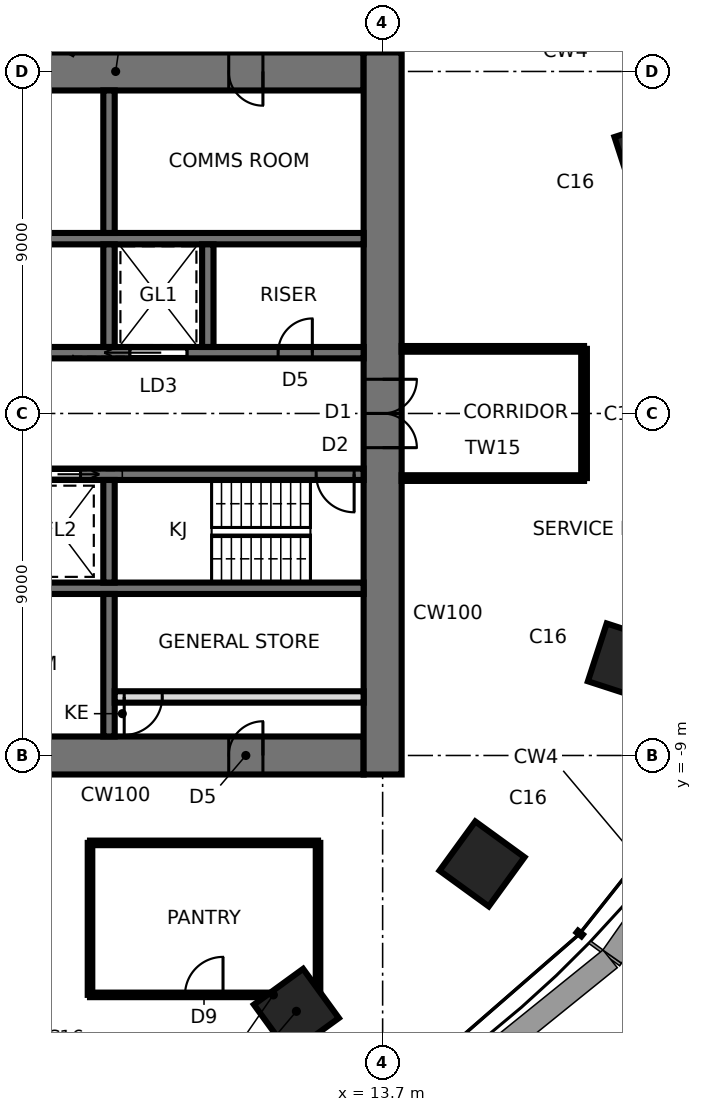
"""IFC4 building model, lengths in metres.
Left out: names, types, materials, properties, quantities, classifications, styles, units other than length and angle.
Written with IfcOpenShell. Run it as: python <this file> out.ifc"""

import sys

from ifc_helpers import new_model, si_unit, direction, frame, frame_2d, origin, origin_2d, place, context, subcontext, project, spatial, rectangle, extrude, element, fill, save


model = new_model("IFC4")
c1 = context("Model", 3, precision=1e-05, world=origin(), true_north=direction((0.0, 1.0)))
c2 = subcontext(c1, "Body", "Model", "MODEL_VIEW")
j1 = project(units=[si_unit("LENGTHUNIT", "METRE"), si_unit("PLANEANGLEUNIT", "RADIAN")], contexts=[c1])
p1 = place(None, origin())
s1 = spatial("IfcSite", under=j1, at=p1, CompositionType="ELEMENT")
p2 = place(p1, origin())
s2 = spatial("IfcBuilding", under=s1, at=p2, CompositionType="ELEMENT")
p3 = place(p2, frame((0.0, 0.0, 135.3)))
s3 = spatial("IfcBuildingStorey", under=s2, at=p3, CompositionType="ELEMENT", Elevation=135.3)
for number, where, z_axis, x_axis in (
    (1, (20.808, 6.761, 0.0), (0.0, 0.0, 1.0), (0.951, 0.309, 0.0)),
    (2, (11.43, -15.733, 0.0), (0.0, 0.0, 1.0), (0.588, -0.809, 0.0)),
    (3, (16.315, -11.854, 0.0), (0.0, 0.0, 1.0), (0.809, -0.588, 0.0)),
    (4, (20.109, -6.534, 0.0), (0.0, 0.0, 1.0), (0.951, -0.309, 0.0)),
):
    element("IfcColumn", number, at=place(p3, frame(where, z_axis=z_axis, x_axis=x_axis)), inside=s3, PredefinedType="COLUMN", context=c2, shape_type="SweptSolid", body=[
        extrude(rectangle(XDim=1.6, YDim=1.6, at=origin_2d()), origin(), (0.0, 0.0, 1.0), 3.9),
    ])
p4 = place(p3, frame((-13.2, -9.0, 0.0), z_axis=(0.0, 0.0, 1.0), x_axis=(1.0, 0.0, 0.0)))
e5 = element("IfcWall", 5, at=p4, inside=s3, PredefinedType="SHEAR", context=c2, shape_type="SweptSolid", body=[
    extrude(rectangle(XDim=26.4, YDim=1.0, at=frame_2d((13.2, 0.0))), origin(), (0.0, 0.0, 1.0), 3.9),
])
p5 = place(p4, frame((2.65, 0.0, 0.0)))
e6 = element("IfcOpeningElement", 6, at=p5, cuts=e5, PredefinedType="OPENING", context=c2, shape_type="SweptSolid", body=[
    extrude(rectangle(XDim=0.9, YDim=2.1, at=frame_2d((0.45, 1.05))), frame((0.0, 0.51, 0.0), z_axis=(0.0, -1.0, 0.0), x_axis=(1.0, 0.0, 0.0)), (0.0, 0.0, 1.0), 1.02),
])
p6 = place(p4, frame((9.5, 0.0, 0.0)))
e7 = element("IfcOpeningElement", 7, at=p6, cuts=e5, PredefinedType="OPENING", context=c2, shape_type="SweptSolid", body=[
    extrude(rectangle(XDim=0.9, YDim=2.1, at=frame_2d((0.45, 1.05))), frame((0.0, 0.51, 0.0), z_axis=(0.0, -1.0, 0.0), x_axis=(1.0, 0.0, 0.0)), (0.0, 0.0, 1.0), 1.02),
])
p7 = place(p4, frame((16.0, 0.0, 0.0)))
e8 = element("IfcOpeningElement", 8, at=p7, cuts=e5, PredefinedType="OPENING", context=c2, shape_type="SweptSolid", body=[
    extrude(rectangle(XDim=0.9, YDim=2.1, at=frame_2d((0.45, 1.05))), frame((0.0, 0.51, 0.0), z_axis=(0.0, -1.0, 0.0), x_axis=(1.0, 0.0, 0.0)), (0.0, 0.0, 1.0), 1.02),
])
p8 = place(p4, frame((22.85, 0.0, 0.0)))
e9 = element("IfcOpeningElement", 9, at=p8, cuts=e5, PredefinedType="OPENING", context=c2, shape_type="SweptSolid", body=[
    extrude(rectangle(XDim=0.9, YDim=2.1, at=frame_2d((0.45, 1.05))), frame((0.0, 0.51, 0.0), z_axis=(0.0, -1.0, 0.0), x_axis=(1.0, 0.0, 0.0)), (0.0, 0.0, 1.0), 1.02),
])
p9 = place(p3, frame((13.2, 9.0, 0.0), z_axis=(0.0, 0.0, 1.0), x_axis=(-1.0, 0.0, 0.0)))
e10 = element("IfcWall", 10, at=p9, inside=s3, PredefinedType="SHEAR", context=c2, shape_type="SweptSolid", body=[
    extrude(rectangle(XDim=26.4, YDim=1.0, at=frame_2d((13.2, 0.0))), origin(), (0.0, 0.0, 1.0), 3.9),
])
p10 = place(p9, frame((2.65, 0.0, 0.0)))
e11 = element("IfcOpeningElement", 11, at=p10, cuts=e10, PredefinedType="OPENING", context=c2, shape_type="SweptSolid", body=[
    extrude(rectangle(XDim=0.9, YDim=2.1, at=frame_2d((0.45, 1.05))), frame((0.0, 0.51, 0.0), z_axis=(0.0, -1.0, 0.0), x_axis=(1.0, 0.0, 0.0)), (0.0, 0.0, 1.0), 1.02),
])
p11 = place(p9, frame((9.5, 0.0, 0.0)))
e12 = element("IfcOpeningElement", 12, at=p11, cuts=e10, PredefinedType="OPENING", context=c2, shape_type="SweptSolid", body=[
    extrude(rectangle(XDim=0.9, YDim=2.1, at=frame_2d((0.45, 1.05))), frame((0.0, 0.51, 0.0), z_axis=(0.0, -1.0, 0.0), x_axis=(1.0, 0.0, 0.0)), (0.0, 0.0, 1.0), 1.02),
])
p12 = place(p9, frame((16.0, 0.0, 0.0)))
e13 = element("IfcOpeningElement", 13, at=p12, cuts=e10, PredefinedType="OPENING", context=c2, shape_type="SweptSolid", body=[
    extrude(rectangle(XDim=0.9, YDim=2.1, at=frame_2d((0.45, 1.05))), frame((0.0, 0.51, 0.0), z_axis=(0.0, -1.0, 0.0), x_axis=(1.0, 0.0, 0.0)), (0.0, 0.0, 1.0), 1.02),
])
p13 = place(p9, frame((21.25, 0.0, 0.0)))
e14 = element("IfcOpeningElement", 14, at=p13, cuts=e10, PredefinedType="OPENING", context=c2, shape_type="SweptSolid", body=[
    extrude(rectangle(XDim=0.9, YDim=2.1, at=frame_2d((0.45, 1.05))), frame((0.0, 0.51, 0.0), z_axis=(0.0, -1.0, 0.0), x_axis=(1.0, 0.0, 0.0)), (0.0, 0.0, 1.0), 1.02),
])
p14 = place(p9, frame((24.8, 0.0, 0.0)))
e15 = element("IfcOpeningElement", 15, at=p14, cuts=e10, PredefinedType="OPENING", context=c2, shape_type="SweptSolid", body=[
    extrude(rectangle(XDim=1.0, YDim=2.1, at=frame_2d((0.5, 1.05))), frame((0.0, 0.51, 0.0), z_axis=(0.0, -1.0, 0.0), x_axis=(1.0, 0.0, 0.0)), (0.0, 0.0, 1.0), 1.02),
])
p15 = place(p3, frame((13.7, -9.5, 0.0), z_axis=(0.0, 0.0, 1.0), x_axis=(0.0, 1.0, 0.0)))
e16 = element("IfcWall", 16, at=p15, inside=s3, PredefinedType="SHEAR", context=c2, shape_type="SweptSolid", body=[
    extrude(rectangle(XDim=19.0, YDim=1.0, at=frame_2d((9.5, 0.0))), origin(), (0.0, 0.0, 1.0), 3.9),
])
p16 = place(p15, frame((8.6, 0.0, 0.0)))
e17 = element("IfcOpeningElement", 17, at=p16, cuts=e16, PredefinedType="OPENING", context=c2, shape_type="SweptSolid", body=[
    extrude(rectangle(XDim=1.8, YDim=2.4, at=frame_2d((0.9, 1.2))), frame((0.0, 0.51, 0.0), z_axis=(0.0, -1.0, 0.0), x_axis=(1.0, 0.0, 0.0)), (0.0, 0.0, 1.0), 1.02),
])
p17 = place(p3, frame((-13.2, 1.6, 0.0), z_axis=(0.0, 0.0, 1.0), x_axis=(1.0, 0.0, 0.0)))
e18 = element("IfcWall", 18, at=p17, inside=s3, PredefinedType="SHEAR", context=c2, shape_type="SweptSolid", body=[
    extrude(rectangle(XDim=26.4, YDim=0.3, at=frame_2d((13.2, 0.0))), origin(), (0.0, 0.0, 1.0), 3.9),
])
p18 = place(p17, frame((0.25, 0.0, 0.0)))
e19 = element("IfcOpeningElement", 19, at=p18, cuts=e18, PredefinedType="OPENING", context=c2, shape_type="SweptSolid", body=[
    extrude(rectangle(XDim=1.0, YDim=2.1, at=frame_2d((0.5, 1.05))), frame((0.0, 0.16, 0.0), z_axis=(0.0, -1.0, 0.0), x_axis=(1.0, 0.0, 0.0)), (0.0, 0.0, 1.0), 0.32),
])
p19 = place(p17, frame((20.25, 0.0, 0.0)))
e20 = element("IfcOpeningElement", 20, at=p19, cuts=e18, PredefinedType="OPENING", context=c2, shape_type="SweptSolid", body=[
    extrude(rectangle(XDim=1.5, YDim=2.4, at=frame_2d((0.75, 1.2))), frame((0.0, 0.16, 0.0), z_axis=(0.0, -1.0, 0.0), x_axis=(1.0, 0.0, 0.0)), (0.0, 0.0, 1.0), 0.32),
])
p20 = place(p17, frame((7.55, 0.0, 0.0)))
e21 = element("IfcOpeningElement", 21, at=p20, cuts=e18, PredefinedType="OPENING", context=c2, shape_type="SweptSolid", body=[
    extrude(rectangle(XDim=0.9, YDim=2.1, at=frame_2d((0.45, 1.05))), frame((0.0, 0.16, 0.0), z_axis=(0.0, -1.0, 0.0), x_axis=(1.0, 0.0, 0.0)), (0.0, 0.0, 1.0), 0.32),
])
p21 = place(p17, frame((10.15, 0.0, 0.0)))
e22 = element("IfcOpeningElement", 22, at=p21, cuts=e18, PredefinedType="OPENING", context=c2, shape_type="SweptSolid", body=[
    extrude(rectangle(XDim=0.9, YDim=2.1, at=frame_2d((0.45, 1.05))), frame((0.0, 0.16, 0.0), z_axis=(0.0, -1.0, 0.0), x_axis=(1.0, 0.0, 0.0)), (0.0, 0.0, 1.0), 0.32),
])
p22 = place(p17, frame((12.75, 0.0, 0.0)))
e23 = element("IfcOpeningElement", 23, at=p22, cuts=e18, PredefinedType="OPENING", context=c2, shape_type="SweptSolid", body=[
    extrude(rectangle(XDim=0.9, YDim=2.1, at=frame_2d((0.45, 1.05))), frame((0.0, 0.16, 0.0), z_axis=(0.0, -1.0, 0.0), x_axis=(1.0, 0.0, 0.0)), (0.0, 0.0, 1.0), 0.32),
])
p23 = place(p17, frame((24.15, 0.0, 0.0)))
e24 = element("IfcOpeningElement", 24, at=p23, cuts=e18, PredefinedType="OPENING", context=c2, shape_type="SweptSolid", body=[
    extrude(rectangle(XDim=0.9, YDim=2.1, at=frame_2d((0.45, 1.05))), frame((0.0, 0.16, 0.0), z_axis=(0.0, -1.0, 0.0), x_axis=(1.0, 0.0, 0.0)), (0.0, 0.0, 1.0), 0.32),
])
p24 = place(p3, frame((-13.2, -1.6, 0.0), z_axis=(0.0, 0.0, 1.0), x_axis=(1.0, 0.0, 0.0)))
e25 = element("IfcWall", 25, at=p24, inside=s3, PredefinedType="SHEAR", context=c2, shape_type="SweptSolid", body=[
    extrude(rectangle(XDim=26.4, YDim=0.3, at=frame_2d((13.2, 0.0))), origin(), (0.0, 0.0, 1.0), 3.9),
])
p25 = place(p24, frame((25.15, 0.0, 0.0)))
e26 = element("IfcOpeningElement", 26, at=p25, cuts=e25, PredefinedType="OPENING", context=c2, shape_type="SweptSolid", body=[
    extrude(rectangle(XDim=1.0, YDim=2.1, at=frame_2d((0.5, 1.05))), frame((0.0, 0.16, 0.0), z_axis=(0.0, -1.0, 0.0), x_axis=(1.0, 0.0, 0.0)), (0.0, 0.0, 1.0), 0.32),
])
p26 = place(p24, frame((7.45, 0.0, 0.0)))
e27 = element("IfcOpeningElement", 27, at=p26, cuts=e25, PredefinedType="OPENING", context=c2, shape_type="SweptSolid", body=[
    extrude(rectangle(XDim=1.1, YDim=2.3, at=frame_2d((0.55, 1.15))), frame((0.0, 0.16, 0.0), z_axis=(0.0, -1.0, 0.0), x_axis=(1.0, 0.0, 0.0)), (0.0, 0.0, 1.0), 0.32),
])
p27 = place(p24, frame((10.05, 0.0, 0.0)))
e28 = element("IfcOpeningElement", 28, at=p27, cuts=e25, PredefinedType="OPENING", context=c2, shape_type="SweptSolid", body=[
    extrude(rectangle(XDim=1.1, YDim=2.3, at=frame_2d((0.55, 1.15))), frame((0.0, 0.16, 0.0), z_axis=(0.0, -1.0, 0.0), x_axis=(1.0, 0.0, 0.0)), (0.0, 0.0, 1.0), 0.32),
])
p28 = place(p24, frame((12.65, 0.0, 0.0)))
e29 = element("IfcOpeningElement", 29, at=p28, cuts=e25, PredefinedType="OPENING", context=c2, shape_type="SweptSolid", body=[
    extrude(rectangle(XDim=1.1, YDim=2.3, at=frame_2d((0.55, 1.15))), frame((0.0, 0.16, 0.0), z_axis=(0.0, -1.0, 0.0), x_axis=(1.0, 0.0, 0.0)), (0.0, 0.0, 1.0), 0.32),
])
p29 = place(p24, frame((15.25, 0.0, 0.0)))
e30 = element("IfcOpeningElement", 30, at=p29, cuts=e25, PredefinedType="OPENING", context=c2, shape_type="SweptSolid", body=[
    extrude(rectangle(XDim=1.1, YDim=2.3, at=frame_2d((0.55, 1.15))), frame((0.0, 0.16, 0.0), z_axis=(0.0, -1.0, 0.0), x_axis=(1.0, 0.0, 0.0)), (0.0, 0.0, 1.0), 0.32),
])
p30 = place(p24, frame((17.85, 0.0, 0.0)))
e31 = element("IfcOpeningElement", 31, at=p30, cuts=e25, PredefinedType="OPENING", context=c2, shape_type="SweptSolid", body=[
    extrude(rectangle(XDim=1.1, YDim=2.3, at=frame_2d((0.55, 1.15))), frame((0.0, 0.16, 0.0), z_axis=(0.0, -1.0, 0.0), x_axis=(1.0, 0.0, 0.0)), (0.0, 0.0, 1.0), 0.32),
])
p31 = place(p24, frame((5.55, 0.0, 0.0)))
e32 = element("IfcOpeningElement", 32, at=p31, cuts=e25, PredefinedType="OPENING", context=c2, shape_type="SweptSolid", body=[
    extrude(rectangle(XDim=0.9, YDim=2.1, at=frame_2d((0.45, 1.05))), frame((0.0, 0.16, 0.0), z_axis=(0.0, -1.0, 0.0), x_axis=(1.0, 0.0, 0.0)), (0.0, 0.0, 1.0), 0.32),
])
for number, where, z_axis, x_axis in (
    (33, (-13.2, 4.6, 0.0), (0.0, 0.0, 1.0), (1.0, 0.0, 0.0)),
    (34, (-13.2, -4.6, 0.0), (0.0, 0.0, 1.0), (1.0, 0.0, 0.0)),
):
    element("IfcWall", number, at=place(p3, frame(where, z_axis=z_axis, x_axis=x_axis)), inside=s3, PredefinedType="SHEAR", context=c2, shape_type="SweptSolid", body=[
        extrude(rectangle(XDim=26.4, YDim=0.3, at=frame_2d((13.2, 0.0))), origin(), (0.0, 0.0, 1.0), 3.9),
    ])
p32 = place(p3, frame((6.5, 1.75, 0.0), z_axis=(0.0, 0.0, 1.0), x_axis=(0.0, 1.0, 0.0)))
e35 = element("IfcWall", 35, at=p32, inside=s3, PredefinedType="SHEAR", context=c2, shape_type="SweptSolid", body=[
    extrude(rectangle(XDim=2.7, YDim=0.3, at=frame_2d((1.35, 0.0))), origin(), (0.0, 0.0, 1.0), 3.9),
])
p33 = place(p3, frame((6.5, 4.75, 0.0), z_axis=(0.0, 0.0, 1.0), x_axis=(0.0, 1.0, 0.0)))
e36 = element("IfcWall", 36, at=p33, inside=s3, PredefinedType="SHEAR", context=c2, shape_type="SweptSolid", body=[
    extrude(rectangle(XDim=3.75, YDim=0.3, at=frame_2d((1.875, 0.0))), origin(), (0.0, 0.0, 1.0), 3.9),
])
p34 = place(p3, frame((6.5, -1.75, 0.0), z_axis=(0.0, 0.0, 1.0), x_axis=(0.0, -1.0, 0.0)))
e37 = element("IfcWall", 37, at=p34, inside=s3, PredefinedType="SHEAR", context=c2, shape_type="SweptSolid", body=[
    extrude(rectangle(XDim=2.7, YDim=0.3, at=frame_2d((1.35, 0.0))), origin(), (0.0, 0.0, 1.0), 3.9),
])
p35 = place(p3, frame((6.5, -4.75, 0.0), z_axis=(0.0, 0.0, 1.0), x_axis=(0.0, -1.0, 0.0)))
e38 = element("IfcWall", 38, at=p35, inside=s3, PredefinedType="SHEAR", context=c2, shape_type="SweptSolid", body=[
    extrude(rectangle(XDim=3.75, YDim=0.3, at=frame_2d((1.875, 0.0))), origin(), (0.0, 0.0, 1.0), 3.9),
])
p36 = place(p3, frame((9.1, 1.75, 0.0), z_axis=(0.0, 0.0, 1.0), x_axis=(0.0, 1.0, 0.0)))
e39 = element("IfcWall", 39, at=p36, inside=s3, PredefinedType="SHEAR", context=c2, shape_type="SweptSolid", body=[
    extrude(rectangle(XDim=2.7, YDim=0.3, at=frame_2d((1.35, 0.0))), origin(), (0.0, 0.0, 1.0), 3.9),
])
p37 = place(p3, frame((6.65, -7.46, 0.0), z_axis=(0.0, 0.0, 1.0), x_axis=(1.0, 0.0, 0.0)))
e40 = element("IfcWall", 40, at=p37, inside=s3, PredefinedType="PARTITIONING", context=c2, shape_type="SweptSolid", body=[
    extrude(rectangle(XDim=6.55, YDim=0.3, at=frame_2d((3.275, 0.0))), origin(), (0.0, 0.0, 1.0), 3.74),
])
p38 = place(p37, frame((0.25, 0.0, 0.0)))
e41 = element("IfcOpeningElement", 41, at=p38, cuts=e40, PredefinedType="OPENING", context=c2, shape_type="SweptSolid", body=[
    extrude(rectangle(XDim=1.0, YDim=2.4, at=frame_2d((0.5, 1.2))), frame((0.0, 0.16, 0.0), z_axis=(0.0, -1.0, 0.0), x_axis=(1.0, 0.0, 0.0)), (0.0, 0.0, 1.0), 0.32),
])
p39 = place(p3, frame((6.0, -15.3, 0.0), z_axis=(0.0, 0.0, 1.0), x_axis=(0.0, 1.0, 0.0)))
e42 = element("IfcWall", 42, at=p39, inside=s3, PredefinedType="PARTITIONING", context=c2, shape_type="SweptSolid", body=[
    extrude(rectangle(XDim=4.0, YDim=0.12, at=frame_2d((2.0, 0.0))), origin(), (0.0, 0.0, 1.0), 3.74),
])
p40 = place(p3, frame((12.0, -15.3, 0.0), z_axis=(0.0, 0.0, 1.0), x_axis=(-1.0, 0.0, 0.0)))
e43 = element("IfcWall", 43, at=p40, inside=s3, PredefinedType="PARTITIONING", context=c2, shape_type="SweptSolid", body=[
    extrude(rectangle(XDim=6.0, YDim=0.12, at=frame_2d((3.0, 0.0))), origin(), (0.0, 0.0, 1.0), 3.74),
])
p41 = place(p40, frame((2.5, 0.0, 0.0)))
e44 = element("IfcOpeningElement", 44, at=p41, cuts=e43, PredefinedType="OPENING", context=c2, shape_type="SweptSolid", body=[
    extrude(rectangle(XDim=1.0, YDim=2.4, at=frame_2d((0.5, 1.2))), frame((0.0, 0.07, 0.0), z_axis=(0.0, -1.0, 0.0), x_axis=(1.0, 0.0, 0.0)), (0.0, 0.0, 1.0), 0.14),
])
p42 = place(p3, frame((6.0, -11.3, 0.0), z_axis=(0.0, 0.0, 1.0), x_axis=(1.0, 0.0, 0.0)))
e45 = element("IfcWall", 45, at=p42, inside=s3, PredefinedType="PARTITIONING", context=c2, shape_type="SweptSolid", body=[
    extrude(rectangle(XDim=6.0, YDim=0.12, at=frame_2d((3.0, 0.0))), origin(), (0.0, 0.0, 1.0), 3.74),
])
p43 = place(p3, frame((12.0, -11.3, 0.0), z_axis=(0.0, 0.0, 1.0), x_axis=(0.0, -1.0, 0.0)))
e46 = element("IfcWall", 46, at=p43, inside=s3, PredefinedType="PARTITIONING", context=c2, shape_type="SweptSolid", body=[
    extrude(rectangle(XDim=4.0, YDim=0.12, at=frame_2d((2.0, 0.0))), origin(), (0.0, 0.0, 1.0), 3.74),
])
p44 = place(p3, frame((14.2, -1.7, 0.0), z_axis=(0.0, 0.0, 1.0), x_axis=(1.0, 0.0, 0.0)))
e47 = element("IfcWall", 47, at=p44, inside=s3, PredefinedType="PARTITIONING", context=c2, shape_type="SweptSolid", body=[
    extrude(rectangle(XDim=4.8, YDim=0.15, at=frame_2d((2.4, 0.0))), origin(), (0.0, 0.0, 1.0), 3.74),
])
p45 = place(p3, frame((19.0, -1.7, 0.0), z_axis=(0.0, 0.0, 1.0), x_axis=(0.0, 1.0, 0.0)))
e48 = element("IfcWall", 48, at=p45, inside=s3, PredefinedType="PARTITIONING", context=c2, shape_type="SweptSolid", body=[
    extrude(rectangle(XDim=3.4, YDim=0.15, at=frame_2d((1.7, 0.0))), origin(), (0.0, 0.0, 1.0), 3.286),
])
p46 = place(p3, frame((19.0, 1.7, 0.0), z_axis=(0.0, 0.0, 1.0), x_axis=(-1.0, 0.0, 0.0)))
e49 = element("IfcWall", 49, at=p46, inside=s3, PredefinedType="PARTITIONING", context=c2, shape_type="SweptSolid", body=[
    extrude(rectangle(XDim=4.8, YDim=0.15, at=frame_2d((2.4, 0.0))), origin(), (0.0, 0.0, 1.0), 3.74),
])
p47 = place(p3, frame((6.524, 11.3, 0.0), z_axis=(0.0, 0.0, 1.0), x_axis=(-0.499929208183, -0.866066271601, 0.0)))
e50 = element("IfcWall", 50, at=p47, inside=s3, PredefinedType="PARTITIONING", context=c2, shape_type="SweptSolid", body=[
    extrude(rectangle(XDim=2.078, YDim=0.12, at=frame_2d((1.039, 0.0))), origin(), (0.0, 0.0, 1.0), 3.74),
])
p48 = place(p16, frame((1.8, 0.0, 0.0), z_axis=(0.0, 0.0, 1.0), x_axis=(-1.0, 0.0, 0.0)))
e51 = element("IfcDoor", 51, at=p48, inside=s3, OperationType="DOUBLE_DOOR_SINGLE_SWING", PredefinedType="DOOR", context=c2, shape_type="SweptSolid", body=[
    extrude(rectangle(XDim=1.72, YDim=2.36, at=frame_2d((0.9, 1.18))), frame((0.0, 0.025, 0.0), z_axis=(0.0, -1.0, 0.0), x_axis=(1.0, 0.0, 0.0)), (0.0, 0.0, 1.0), 0.05),
    extrude(rectangle(XDim=0.04, YDim=2.4, at=frame_2d((1.78, 1.2))), frame((0.0, 0.25, 0.0), z_axis=(0.0, -1.0, 0.0), x_axis=(1.0, 0.0, 0.0)), (0.0, 0.0, 1.0), 0.5),
    extrude(rectangle(XDim=0.04, YDim=2.4, at=frame_2d((0.02, 1.2))), frame((0.0, 0.25, 0.0), z_axis=(0.0, -1.0, 0.0), x_axis=(1.0, 0.0, 0.0)), (0.0, 0.0, 1.0), 0.5),
    extrude(rectangle(XDim=1.72, YDim=0.04, at=frame_2d((0.9, 2.38))), frame((0.0, 0.25, 0.0), z_axis=(0.0, -1.0, 0.0), x_axis=(1.0, 0.0, 0.0)), (0.0, 0.0, 1.0), 0.5),
])
fill(e17, e51)
p49 = place(p25, frame((1.0, 0.0, 0.0), z_axis=(0.0, 0.0, 1.0), x_axis=(-1.0, 0.0, 0.0)))
e52 = element("IfcDoor", 52, at=p49, inside=s3, OperationType="SINGLE_SWING_LEFT", PredefinedType="DOOR", context=c2, shape_type="SweptSolid", body=[
    extrude(rectangle(XDim=1.0, YDim=2.1, at=frame_2d((0.5, 1.05))), frame((0.0, 0.025, 0.0), z_axis=(0.0, -1.0, 0.0), x_axis=(1.0, 0.0, 0.0)), (0.0, 0.0, 1.0), 0.05),
])
fill(e26, e52)
p50 = place(p19, origin())
e53 = element("IfcDoor", 53, at=p50, inside=s3, OperationType="SLIDING_TO_LEFT", PredefinedType="DOOR", context=c2, shape_type="SweptSolid", body=[
    extrude(rectangle(XDim=1.5, YDim=2.4, at=frame_2d((0.75, 1.2))), frame((0.0, 0.025, 0.0), z_axis=(0.0, -1.0, 0.0), x_axis=(1.0, 0.0, 0.0)), (0.0, 0.0, 1.0), 0.05),
])
fill(e20, e53)
p51 = place(p30, frame((1.1, 0.0, 0.0), z_axis=(0.0, 0.0, 1.0), x_axis=(-1.0, 0.0, 0.0)))
e54 = element("IfcDoor", 54, at=p51, inside=s3, OperationType="SLIDING_TO_LEFT", PredefinedType="DOOR", context=c2, shape_type="SweptSolid", body=[
    extrude(rectangle(XDim=1.1, YDim=2.3, at=frame_2d((0.55, 1.15))), frame((0.0, 0.025, 0.0), z_axis=(0.0, -1.0, 0.0), x_axis=(1.0, 0.0, 0.0)), (0.0, 0.0, 1.0), 0.05),
])
fill(e31, e54)
p52 = place(p23, origin())
e55 = element("IfcDoor", 55, at=p52, inside=s3, OperationType="SINGLE_SWING_RIGHT", PredefinedType="DOOR", context=c2, shape_type="SweptSolid", body=[
    extrude(rectangle(XDim=0.9, YDim=2.1, at=frame_2d((0.45, 1.05))), frame((0.0, 0.025, 0.0), z_axis=(0.0, -1.0, 0.0), x_axis=(1.0, 0.0, 0.0)), (0.0, 0.0, 1.0), 0.05),
])
fill(e24, e55)
p53 = place(p10, origin())
e56 = element("IfcDoor", 56, at=p53, inside=s3, OperationType="SINGLE_SWING_LEFT", PredefinedType="DOOR", context=c2, shape_type="SweptSolid", body=[
    extrude(rectangle(XDim=0.82, YDim=2.06, at=frame_2d((0.45, 1.03))), frame((0.0, 0.025, 0.0), z_axis=(0.0, -1.0, 0.0), x_axis=(1.0, 0.0, 0.0)), (0.0, 0.0, 1.0), 0.05),
    extrude(rectangle(XDim=0.04, YDim=2.1, at=frame_2d((0.02, 1.05))), frame((0.0, 0.25, 0.0), z_axis=(0.0, -1.0, 0.0), x_axis=(1.0, 0.0, 0.0)), (0.0, 0.0, 1.0), 0.5),
    extrude(rectangle(XDim=0.04, YDim=2.1, at=frame_2d((0.88, 1.05))), frame((0.0, 0.25, 0.0), z_axis=(0.0, -1.0, 0.0), x_axis=(1.0, 0.0, 0.0)), (0.0, 0.0, 1.0), 0.5),
    extrude(rectangle(XDim=0.82, YDim=0.04, at=frame_2d((0.45, 2.08))), frame((0.0, 0.25, 0.0), z_axis=(0.0, -1.0, 0.0), x_axis=(1.0, 0.0, 0.0)), (0.0, 0.0, 1.0), 0.5),
])
fill(e11, e56)
p54 = place(p8, origin())
e57 = element("IfcDoor", 57, at=p54, inside=s3, OperationType="SINGLE_SWING_RIGHT", PredefinedType="DOOR", context=c2, shape_type="SweptSolid", body=[
    extrude(rectangle(XDim=0.82, YDim=2.06, at=frame_2d((0.45, 1.03))), frame((0.0, 0.025, 0.0), z_axis=(0.0, -1.0, 0.0), x_axis=(1.0, 0.0, 0.0)), (0.0, 0.0, 1.0), 0.05),
    extrude(rectangle(XDim=0.04, YDim=2.1, at=frame_2d((0.02, 1.05))), frame((0.0, 0.25, 0.0), z_axis=(0.0, -1.0, 0.0), x_axis=(1.0, 0.0, 0.0)), (0.0, 0.0, 1.0), 0.5),
    extrude(rectangle(XDim=0.04, YDim=2.1, at=frame_2d((0.88, 1.05))), frame((0.0, 0.25, 0.0), z_axis=(0.0, -1.0, 0.0), x_axis=(1.0, 0.0, 0.0)), (0.0, 0.0, 1.0), 0.5),
    extrude(rectangle(XDim=0.82, YDim=0.04, at=frame_2d((0.45, 2.08))), frame((0.0, 0.25, 0.0), z_axis=(0.0, -1.0, 0.0), x_axis=(1.0, 0.0, 0.0)), (0.0, 0.0, 1.0), 0.5),
])
fill(e9, e57)
p55 = place(p38, frame((1.0, 0.0, 0.0), z_axis=(0.0, 0.0, 1.0), x_axis=(-1.0, 0.0, 0.0)))
e58 = element("IfcDoor", 58, at=p55, inside=s3, OperationType="SINGLE_SWING_RIGHT", PredefinedType="DOOR", context=c2, shape_type="SweptSolid", body=[
    extrude(rectangle(XDim=1.0, YDim=2.4, at=frame_2d((0.5, 1.2))), frame((0.0, 0.025, 0.0), z_axis=(0.0, -1.0, 0.0), x_axis=(1.0, 0.0, 0.0)), (0.0, 0.0, 1.0), 0.05),
])
fill(e41, e58)
p56 = place(p41, frame((1.0, 0.0, 0.0), z_axis=(0.0, 0.0, 1.0), x_axis=(-1.0, 0.0, 0.0)))
e59 = element("IfcDoor", 59, at=p56, inside=s3, OperationType="SINGLE_SWING_RIGHT", PredefinedType="DOOR", context=c2, shape_type="SweptSolid", body=[
    extrude(rectangle(XDim=1.0, YDim=2.4, at=frame_2d((0.5, 1.2))), frame((0.0, 0.025, 0.0), z_axis=(0.0, -1.0, 0.0), x_axis=(1.0, 0.0, 0.0)), (0.0, 0.0, 1.0), 0.05),
])
fill(e44, e59)
save(model, sys.argv[1])
